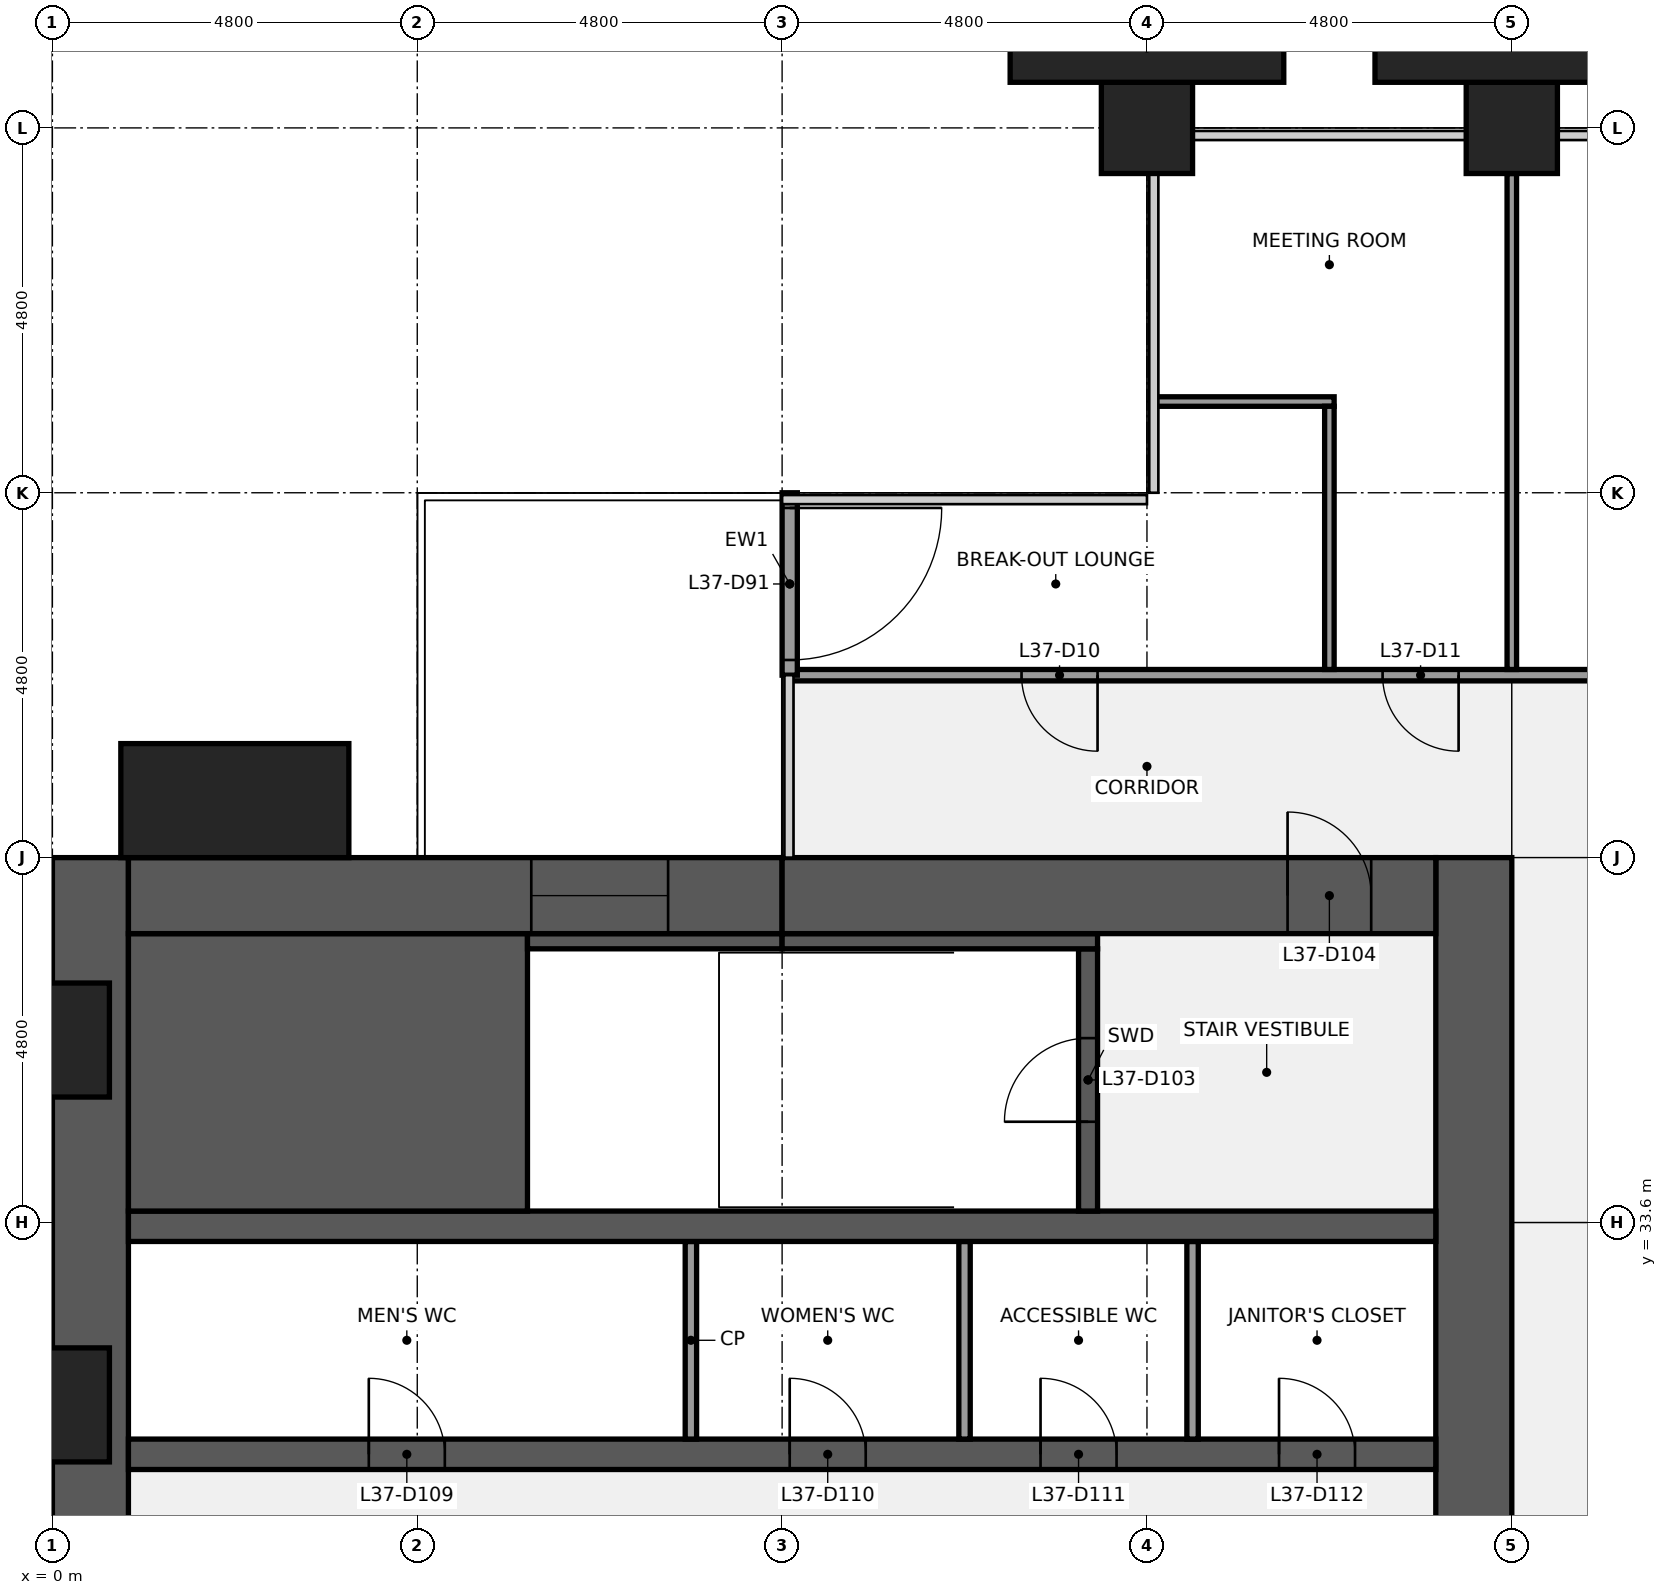
"""IFC4 building model, lengths in metres.
Left out: names, types, materials, properties, quantities, classifications, styles, units other than length and angle.
Written with IfcOpenShell. Run it as: python <this file> out.ifc"""

import sys

from ifc_helpers import new_model, si_unit, direction, frame, frame_2d, origin, origin_2d, place, context, subcontext, project, spatial, rectangle, extrude, element, fill, save


model = new_model("IFC4")
c1 = context("Model", 3, precision=1e-05, world=origin(), true_north=direction((0.0, 1.0)))
c2 = subcontext(c1, "Body", "Model", "MODEL_VIEW")
j1 = project(units=[si_unit("LENGTHUNIT", "METRE"), si_unit("PLANEANGLEUNIT", "RADIAN")], contexts=[c1])
p1 = place(None, origin())
s1 = spatial("IfcSite", under=j1, at=p1, CompositionType="ELEMENT")
p2 = place(p1, origin())
s2 = spatial("IfcBuilding", under=s1, at=p2, CompositionType="ELEMENT")
p3 = place(p2, frame((0.0, 0.0, 168.1)))
s3 = spatial("IfcBuildingStorey", under=s2, at=p3, CompositionType="ELEMENT", Elevation=168.1)
for number, where, z_axis, x_axis in (
    (1, (14.4, 48.0, 0.0), (0.0, 0.0, 1.0), (1.0, 0.0, 0.0)),
    (2, (19.2, 48.0, 0.0), (0.0, 0.0, 1.0), (1.0, 0.0, 0.0)),
):
    element("IfcColumn", number, at=place(p3, frame(where, z_axis=z_axis, x_axis=x_axis)), inside=s3, PredefinedType="COLUMN", context=c2, shape_type="SweptSolid", body=[
        extrude(rectangle(XDim=1.2, YDim=1.2, at=origin_2d()), origin(), (0.0, 0.0, 1.0), 4.0),
    ])
p4 = place(p3, frame((0.5, 9.6, 0.0), z_axis=(0.0, 0.0, 1.0), x_axis=(0.0, 1.0, 0.0)))
e3 = element("IfcWall", 3, at=p4, inside=s3, PredefinedType="SHEAR", context=c2, shape_type="SweptSolid", body=[
    extrude(rectangle(XDim=28.8, YDim=1.0, at=frame_2d((14.4, 0.0))), origin(), (0.0, 0.0, 1.0), 3.84),
])
p5 = place(p4, frame((8.85, 0.0, 0.9)))
e4 = element("IfcOpeningElement", 4, at=p5, cuts=e3, PredefinedType="OPENING", context=c2, shape_type="SweptSolid", body=[
    extrude(rectangle(XDim=1.5, YDim=1.5, at=frame_2d((0.75, 0.75))), frame((0.0, 0.51, 0.0), z_axis=(0.0, -1.0, 0.0), x_axis=(1.0, 0.0, 0.0)), (0.0, 0.0, 1.0), 1.02),
])
p6 = place(p4, frame((18.45, 0.0, 0.9)))
e5 = element("IfcOpeningElement", 5, at=p6, cuts=e3, PredefinedType="OPENING", context=c2, shape_type="SweptSolid", body=[
    extrude(rectangle(XDim=1.5, YDim=1.5, at=frame_2d((0.75, 0.75))), frame((0.0, 0.51, 0.0), z_axis=(0.0, -1.0, 0.0), x_axis=(1.0, 0.0, 0.0)), (0.0, 0.0, 1.0), 1.02),
])
p7 = place(p3, frame((18.7, 38.4, 0.0), z_axis=(0.0, 0.0, 1.0), x_axis=(0.0, -1.0, 0.0)))
e6 = element("IfcWall", 6, at=p7, inside=s3, PredefinedType="SHEAR", context=c2, shape_type="SweptSolid", body=[
    extrude(rectangle(XDim=28.8, YDim=1.0, at=frame_2d((14.4, 0.0))), origin(), (0.0, 0.0, 1.0), 3.84),
])
p8 = place(p7, frame((18.3, 0.0, 0.0)))
e7 = element("IfcOpeningElement", 7, at=p8, cuts=e6, PredefinedType="OPENING", context=c2, shape_type="SweptSolid", body=[
    extrude(rectangle(XDim=1.8, YDim=2.1, at=frame_2d((0.9, 1.05))), frame((0.0, 0.51, 0.0), z_axis=(0.0, -1.0, 0.0), x_axis=(1.0, 0.0, 0.0)), (0.0, 0.0, 1.0), 1.02),
])
p9 = place(p7, frame((8.7, 0.0, 0.0)))
e8 = element("IfcOpeningElement", 8, at=p9, cuts=e6, PredefinedType="OPENING", context=c2, shape_type="SweptSolid", body=[
    extrude(rectangle(XDim=1.8, YDim=2.1, at=frame_2d((0.9, 1.05))), frame((0.0, 0.51, 0.0), z_axis=(0.0, -1.0, 0.0), x_axis=(1.0, 0.0, 0.0)), (0.0, 0.0, 1.0), 1.02),
])
p10 = place(p3, frame((1.0, 30.55, 0.0), z_axis=(0.0, 0.0, 1.0), x_axis=(1.0, 0.0, 0.0)))
e9 = element("IfcWall", 9, at=p10, inside=s3, PredefinedType="SHEAR", context=c2, shape_type="SweptSolid", body=[
    extrude(rectangle(XDim=17.2, YDim=0.4, at=frame_2d((8.6, 0.0))), origin(), (0.0, 0.0, 1.0), 3.84),
])
p11 = place(p10, frame((3.163, 0.0, 0.0)))
e10 = element("IfcOpeningElement", 10, at=p11, cuts=e9, PredefinedType="OPENING", context=c2, shape_type="SweptSolid", body=[
    extrude(rectangle(XDim=1.0, YDim=2.1, at=frame_2d((0.5, 1.05))), frame((0.0, 0.21, 0.0), z_axis=(0.0, -1.0, 0.0), x_axis=(1.0, 0.0, 0.0)), (0.0, 0.0, 1.0), 0.42),
])
p12 = place(p10, frame((8.7, 0.0, 0.0)))
e11 = element("IfcOpeningElement", 11, at=p12, cuts=e9, PredefinedType="OPENING", context=c2, shape_type="SweptSolid", body=[
    extrude(rectangle(XDim=1.0, YDim=2.1, at=frame_2d((0.5, 1.05))), frame((0.0, 0.21, 0.0), z_axis=(0.0, -1.0, 0.0), x_axis=(1.0, 0.0, 0.0)), (0.0, 0.0, 1.0), 0.42),
])
p13 = place(p10, frame((12.0, 0.0, 0.0)))
e12 = element("IfcOpeningElement", 12, at=p13, cuts=e9, PredefinedType="OPENING", context=c2, shape_type="SweptSolid", body=[
    extrude(rectangle(XDim=1.0, YDim=2.1, at=frame_2d((0.5, 1.05))), frame((0.0, 0.21, 0.0), z_axis=(0.0, -1.0, 0.0), x_axis=(1.0, 0.0, 0.0)), (0.0, 0.0, 1.0), 0.42),
])
p14 = place(p10, frame((15.137, 0.0, 0.0)))
e13 = element("IfcOpeningElement", 13, at=p14, cuts=e9, PredefinedType="OPENING", context=c2, shape_type="SweptSolid", body=[
    extrude(rectangle(XDim=1.0, YDim=2.1, at=frame_2d((0.5, 1.05))), frame((0.0, 0.21, 0.0), z_axis=(0.0, -1.0, 0.0), x_axis=(1.0, 0.0, 0.0)), (0.0, 0.0, 1.0), 0.42),
])
for number, where, z_axis, x_axis in (
    (14, (8.4, 30.75, 0.0), (0.0, 0.0, 1.0), (0.0, 1.0, 0.0)),
    (15, (12.0, 30.75, 0.0), (0.0, 0.0, 1.0), (0.0, 1.0, 0.0)),
    (16, (15.0, 30.75, 0.0), (0.0, 0.0, 1.0), (0.0, 1.0, 0.0)),
):
    element("IfcWall", number, at=place(p3, frame(where, z_axis=z_axis, x_axis=x_axis)), inside=s3, PredefinedType="PARTITIONING", context=c2, shape_type="SweptSolid", body=[
        extrude(rectangle(XDim=2.6, YDim=0.15, at=frame_2d((1.3, 0.0))), origin(), (0.0, 0.0, 1.0), 3.84),
    ])
p15 = place(p3, frame((1.0, 33.55, 0.0), z_axis=(0.0, 0.0, 1.0), x_axis=(1.0, 0.0, 0.0)))
e17 = element("IfcWall", 17, at=p15, inside=s3, PredefinedType="SHEAR", context=c2, shape_type="SweptSolid", body=[
    extrude(rectangle(XDim=17.2, YDim=0.4, at=frame_2d((8.6, 0.0))), origin(), (0.0, 0.0, 1.0), 3.84),
])
p16 = place(p3, frame((1.0, 35.575, 0.0), z_axis=(0.0, 0.0, 1.0), x_axis=(1.0, 0.0, 0.0)))
e18 = element("IfcWall", 18, at=p16, inside=s3, PredefinedType="SHEAR", context=c2, shape_type="SweptSolid", body=[
    extrude(rectangle(XDim=5.25, YDim=3.65, at=frame_2d((2.625, 0.0))), origin(), (0.0, 0.0, 1.0), 3.84),
])
p17 = place(p3, frame((13.625, 33.75, 0.0), z_axis=(0.0, 0.0, 1.0), x_axis=(0.0, 1.0, 0.0)))
e19 = element("IfcWall", 19, at=p17, inside=s3, PredefinedType="SHEAR", context=c2, shape_type="SweptSolid", body=[
    extrude(rectangle(XDim=3.45, YDim=0.25, at=frame_2d((1.725, 0.0))), origin(), (0.0, 0.0, 1.0), 3.84),
])
p18 = place(p17, frame((1.175, 0.0, 0.0)))
e20 = element("IfcOpeningElement", 20, at=p18, cuts=e19, PredefinedType="OPENING", context=c2, shape_type="SweptSolid", body=[
    extrude(rectangle(XDim=1.1, YDim=2.1, at=frame_2d((0.55, 1.05))), frame((0.0, 0.135, 0.0), z_axis=(0.0, -1.0, 0.0), x_axis=(1.0, 0.0, 0.0)), (0.0, 0.0, 1.0), 0.27),
])
p19 = place(p3, frame((6.25, 37.3, 0.0), z_axis=(0.0, 0.0, 1.0), x_axis=(1.0, 0.0, 0.0)))
e21 = element("IfcWall", 21, at=p19, inside=s3, PredefinedType="SHEAR", context=c2, shape_type="SweptSolid", body=[
    extrude(rectangle(XDim=3.35, YDim=0.2, at=frame_2d((1.675, 0.0))), origin(), (0.0, 0.0, 1.0), 3.84),
])
p20 = place(p3, frame((9.6, 37.3, 0.0), z_axis=(0.0, 0.0, 1.0), x_axis=(1.0, 0.0, 0.0)))
e22 = element("IfcWall", 22, at=p20, inside=s3, PredefinedType="SHEAR", context=c2, shape_type="SweptSolid", body=[
    extrude(rectangle(XDim=4.15, YDim=0.2, at=frame_2d((2.075, 0.0))), origin(), (0.0, 0.0, 1.0), 3.84),
])
p21 = place(p3, frame((1.0, 37.9, 0.0), z_axis=(0.0, 0.0, 1.0), x_axis=(1.0, 0.0, 0.0)))
e23 = element("IfcWall", 23, at=p21, inside=s3, PredefinedType="SHEAR", context=c2, shape_type="SweptSolid", body=[
    extrude(rectangle(XDim=8.6, YDim=1.0, at=frame_2d((4.3, 0.0))), origin(), (0.0, 0.0, 1.0), 3.84),
])
p22 = place(p21, frame((5.3, 0.0, 0.9)))
e24 = element("IfcOpeningElement", 24, at=p22, cuts=e23, PredefinedType="OPENING", context=c2, shape_type="SweptSolid", body=[
    extrude(rectangle(XDim=1.8, YDim=1.5, at=frame_2d((0.9, 0.75))), frame((0.0, 0.51, 0.0), z_axis=(0.0, -1.0, 0.0), x_axis=(1.0, 0.0, 0.0)), (0.0, 0.0, 1.0), 1.02),
])
p23 = place(p3, frame((9.6, 37.9, 0.0), z_axis=(0.0, 0.0, 1.0), x_axis=(1.0, 0.0, 0.0)))
e25 = element("IfcWall", 25, at=p23, inside=s3, PredefinedType="SHEAR", context=c2, shape_type="SweptSolid", body=[
    extrude(rectangle(XDim=8.6, YDim=1.0, at=frame_2d((4.3, 0.0))), origin(), (0.0, 0.0, 1.0), 3.84),
])
p24 = place(p23, frame((6.65, 0.0, 0.0)))
e26 = element("IfcOpeningElement", 26, at=p24, cuts=e25, PredefinedType="OPENING", context=c2, shape_type="SweptSolid", body=[
    extrude(rectangle(XDim=1.1, YDim=2.1, at=frame_2d((0.55, 1.05))), frame((0.0, 0.51, 0.0), z_axis=(0.0, -1.0, 0.0), x_axis=(1.0, 0.0, 0.0)), (0.0, 0.0, 1.0), 1.02),
])
p25 = place(p3, frame((9.7, 40.8, 0.0), z_axis=(0.0, 0.0, 1.0), x_axis=(1.0, 0.0, 0.0)))
e27 = element("IfcWall", 27, at=p25, inside=s3, PredefinedType="PARTITIONING", context=c2, shape_type="SweptSolid", body=[
    extrude(rectangle(XDim=38.2, YDim=0.15, at=frame_2d((19.1, 0.0))), origin(), (0.0, 0.0, 1.0), 2.936),
])
p26 = place(p25, frame((3.05, 0.0, 0.0)))
e28 = element("IfcOpeningElement", 28, at=p26, cuts=e27, PredefinedType="OPENING", context=c2, shape_type="SweptSolid", body=[
    extrude(rectangle(XDim=1.0, YDim=2.1, at=frame_2d((0.5, 1.05))), frame((0.0, 0.085, 0.0), z_axis=(0.0, -1.0, 0.0), x_axis=(1.0, 0.0, 0.0)), (0.0, 0.0, 1.0), 0.17),
])
p27 = place(p25, frame((7.8, 0.0, 0.0)))
e29 = element("IfcOpeningElement", 29, at=p27, cuts=e27, PredefinedType="OPENING", context=c2, shape_type="SweptSolid", body=[
    extrude(rectangle(XDim=1.0, YDim=2.1, at=frame_2d((0.5, 1.05))), frame((0.0, 0.085, 0.0), z_axis=(0.0, -1.0, 0.0), x_axis=(1.0, 0.0, 0.0)), (0.0, 0.0, 1.0), 0.17),
])
p28 = place(p25, frame((15.0, 0.0, 0.0)))
e30 = element("IfcOpeningElement", 30, at=p28, cuts=e27, PredefinedType="OPENING", context=c2, shape_type="SweptSolid", body=[
    extrude(rectangle(XDim=1.0, YDim=2.1, at=frame_2d((0.5, 1.05))), frame((0.0, 0.085, 0.0), z_axis=(0.0, -1.0, 0.0), x_axis=(1.0, 0.0, 0.0)), (0.0, 0.0, 1.0), 0.17),
])
p29 = place(p25, frame((24.6, 0.0, 0.0)))
e31 = element("IfcOpeningElement", 31, at=p29, cuts=e27, PredefinedType="OPENING", context=c2, shape_type="SweptSolid", body=[
    extrude(rectangle(XDim=1.0, YDim=2.1, at=frame_2d((0.5, 1.05))), frame((0.0, 0.085, 0.0), z_axis=(0.0, -1.0, 0.0), x_axis=(1.0, 0.0, 0.0)), (0.0, 0.0, 1.0), 0.17),
])
p30 = place(p25, frame((32.95, 0.0, 0.0)))
e32 = element("IfcOpeningElement", 32, at=p30, cuts=e27, PredefinedType="OPENING", context=c2, shape_type="SweptSolid", body=[
    extrude(rectangle(XDim=1.0, YDim=2.1, at=frame_2d((0.5, 1.05))), frame((0.0, 0.085, 0.0), z_axis=(0.0, -1.0, 0.0), x_axis=(1.0, 0.0, 0.0)), (0.0, 0.0, 1.0), 0.17),
])
p31 = place(p3, frame((14.5, 44.4, 0.0), z_axis=(0.0, 0.0, 1.0), x_axis=(1.0, 0.0, 0.0)))
e33 = element("IfcWall", 33, at=p31, inside=s3, PredefinedType="PARTITIONING", context=c2, shape_type="SweptSolid", body=[
    extrude(rectangle(XDim=2.363, YDim=0.125, at=frame_2d((1.181, 0.0))), origin(), (0.0, 0.0, 1.0), 2.936),
])
p32 = place(p3, frame((16.8, 40.875, 0.0), z_axis=(0.0, 0.0, 1.0), x_axis=(0.0, 1.0, 0.0)))
e34 = element("IfcWall", 34, at=p32, inside=s3, PredefinedType="PARTITIONING", context=c2, shape_type="SweptSolid", body=[
    extrude(rectangle(XDim=3.462, YDim=0.125, at=frame_2d((1.731, 0.0))), origin(), (0.0, 0.0, 1.0), 2.936),
])
p33 = place(p3, frame((19.2, 40.875, 0.0), z_axis=(0.0, 0.0, 1.0), x_axis=(0.0, 1.0, 0.0)))
e35 = element("IfcWall", 35, at=p33, inside=s3, PredefinedType="PARTITIONING", context=c2, shape_type="SweptSolid", body=[
    extrude(rectangle(XDim=6.525, YDim=0.125, at=frame_2d((3.262, 0.0))), origin(), (0.0, 0.0, 1.0), 2.936),
])
p34 = place(p3, frame((9.7, 43.2, 0.0), z_axis=(0.0, 0.0, 1.0), x_axis=(0.0, -1.0, 0.0)))
e36 = element("IfcWall", 36, at=p34, inside=s3, PredefinedType="SOLIDWALL", context=c2, shape_type="SweptSolid", body=[
    extrude(rectangle(XDim=2.4, YDim=0.2, at=frame_2d((1.2, 0.0))), origin(), (0.0, 0.0, 1.0), 3.238),
])
p35 = place(p34, frame((0.2, 0.0, 0.0)))
e37 = element("IfcOpeningElement", 37, at=p35, cuts=e36, PredefinedType="OPENING", context=c2, shape_type="SweptSolid", body=[
    extrude(rectangle(XDim=2.0, YDim=2.1, at=frame_2d((1.0, 1.05))), frame((0.0, 0.11, 0.0), z_axis=(0.0, -1.0, 0.0), x_axis=(1.0, 0.0, 0.0)), (0.0, 0.0, 1.0), 0.22),
])
p36 = place(p3, frame((2.4, 39.15, 0.0), z_axis=(0.0, 0.0, 1.0), x_axis=(1.0, 0.0, 0.0)))
e38 = element("IfcColumn", 38, at=p36, inside=s3, PredefinedType="PILASTER", context=c2, shape_type="SweptSolid", body=[
    extrude(rectangle(XDim=3.0, YDim=1.5, at=origin_2d()), origin(), (0.0, 0.0, 1.0), 4.0),
])
for number, where, z_axis, x_axis in (
    (39, (14.4, 49.05, 0.0), (0.0, 0.0, 1.0), (1.0, 0.0, 0.0)),
    (40, (19.2, 49.05, 0.0), (0.0, 0.0, 1.0), (1.0, 0.0, 0.0)),
):
    element("IfcColumn", number, at=place(p3, frame(where, z_axis=z_axis, x_axis=x_axis)), inside=s3, PredefinedType="PILASTER", context=c2, shape_type="SweptSolid", body=[
        extrude(rectangle(XDim=3.6, YDim=0.9, at=origin_2d()), origin(), (0.0, 0.0, 1.0), 4.0),
    ])
p37 = place(p18, origin())
e41 = element("IfcDoor", 41, at=p37, inside=s3, OperationType="SINGLE_SWING_LEFT", PredefinedType="DOOR", context=c2, shape_type="SweptSolid", body=[
    extrude(rectangle(XDim=1.1, YDim=2.1, at=frame_2d((0.55, 1.05))), frame((0.0, 0.025, 0.0), z_axis=(0.0, -1.0, 0.0), x_axis=(1.0, 0.0, 0.0)), (0.0, 0.0, 1.0), 0.05),
])
fill(e20, e41)
p38 = place(p24, origin())
e42 = element("IfcDoor", 42, at=p38, inside=s3, OperationType="SINGLE_SWING_LEFT", PredefinedType="DOOR", context=c2, shape_type="SweptSolid", body=[
    extrude(rectangle(XDim=1.1, YDim=2.1, at=frame_2d((0.55, 1.05))), frame((0.0, 0.025, 0.0), z_axis=(0.0, -1.0, 0.0), x_axis=(1.0, 0.0, 0.0)), (0.0, 0.0, 1.0), 0.05),
])
fill(e26, e42)
p39 = place(p11, origin())
e43 = element("IfcDoor", 43, at=p39, inside=s3, OperationType="SINGLE_SWING_LEFT", PredefinedType="DOOR", context=c2, shape_type="SweptSolid", body=[
    extrude(rectangle(XDim=1.0, YDim=2.1, at=frame_2d((0.5, 1.05))), frame((0.0, 0.025, 0.0), z_axis=(0.0, -1.0, 0.0), x_axis=(1.0, 0.0, 0.0)), (0.0, 0.0, 1.0), 0.05),
])
fill(e10, e43)
p40 = place(p12, origin())
e44 = element("IfcDoor", 44, at=p40, inside=s3, OperationType="SINGLE_SWING_LEFT", PredefinedType="DOOR", context=c2, shape_type="SweptSolid", body=[
    extrude(rectangle(XDim=1.0, YDim=2.1, at=frame_2d((0.5, 1.05))), frame((0.0, 0.025, 0.0), z_axis=(0.0, -1.0, 0.0), x_axis=(1.0, 0.0, 0.0)), (0.0, 0.0, 1.0), 0.05),
])
fill(e11, e44)
p41 = place(p13, origin())
e45 = element("IfcDoor", 45, at=p41, inside=s3, OperationType="SINGLE_SWING_LEFT", PredefinedType="DOOR", context=c2, shape_type="SweptSolid", body=[
    extrude(rectangle(XDim=1.0, YDim=2.1, at=frame_2d((0.5, 1.05))), frame((0.0, 0.025, 0.0), z_axis=(0.0, -1.0, 0.0), x_axis=(1.0, 0.0, 0.0)), (0.0, 0.0, 1.0), 0.05),
])
fill(e12, e45)
p42 = place(p14, origin())
e46 = element("IfcDoor", 46, at=p42, inside=s3, OperationType="SINGLE_SWING_LEFT", PredefinedType="DOOR", context=c2, shape_type="SweptSolid", body=[
    extrude(rectangle(XDim=1.0, YDim=2.1, at=frame_2d((0.5, 1.05))), frame((0.0, 0.025, 0.0), z_axis=(0.0, -1.0, 0.0), x_axis=(1.0, 0.0, 0.0)), (0.0, 0.0, 1.0), 0.05),
])
fill(e13, e46)
p43 = place(p22, origin())
e47 = element("IfcWindow", 47, at=p43, inside=s3, PartitioningType="SINGLE_PANEL", PredefinedType="WINDOW", context=c2, shape_type="SweptSolid", body=[
    extrude(rectangle(XDim=1.8, YDim=1.5, at=frame_2d((0.9, 0.75))), frame((0.0, 0.03, 0.0), z_axis=(0.0, -1.0, 0.0), x_axis=(1.0, 0.0, 0.0)), (0.0, 0.0, 1.0), 0.06),
])
fill(e24, e47)
p44 = place(p26, origin())
e48 = element("IfcDoor", 48, at=p44, inside=s3, OperationType="SINGLE_SWING_RIGHT", PredefinedType="DOOR", context=c2, shape_type="SweptSolid", body=[
    extrude(rectangle(XDim=1.0, YDim=2.1, at=frame_2d((0.5, 1.05))), frame((0.0, 0.025, 0.0), z_axis=(0.0, -1.0, 0.0), x_axis=(1.0, 0.0, 0.0)), (0.0, 0.0, 1.0), 0.05),
])
fill(e28, e48)
p45 = place(p27, origin())
e49 = element("IfcDoor", 49, at=p45, inside=s3, OperationType="SINGLE_SWING_RIGHT", PredefinedType="DOOR", context=c2, shape_type="SweptSolid", body=[
    extrude(rectangle(XDim=1.0, YDim=2.1, at=frame_2d((0.5, 1.05))), frame((0.0, 0.025, 0.0), z_axis=(0.0, -1.0, 0.0), x_axis=(1.0, 0.0, 0.0)), (0.0, 0.0, 1.0), 0.05),
])
fill(e29, e49)
p46 = place(p35, origin())
e50 = element("IfcDoor", 50, at=p46, inside=s3, OperationType="SINGLE_SWING_LEFT", PredefinedType="DOOR", context=c2, shape_type="SweptSolid", body=[
    extrude(rectangle(XDim=2.0, YDim=2.1, at=frame_2d((1.0, 1.05))), frame((0.0, 0.025, 0.0), z_axis=(0.0, -1.0, 0.0), x_axis=(1.0, 0.0, 0.0)), (0.0, 0.0, 1.0), 0.05),
])
fill(e37, e50)
save(model, sys.argv[1])
